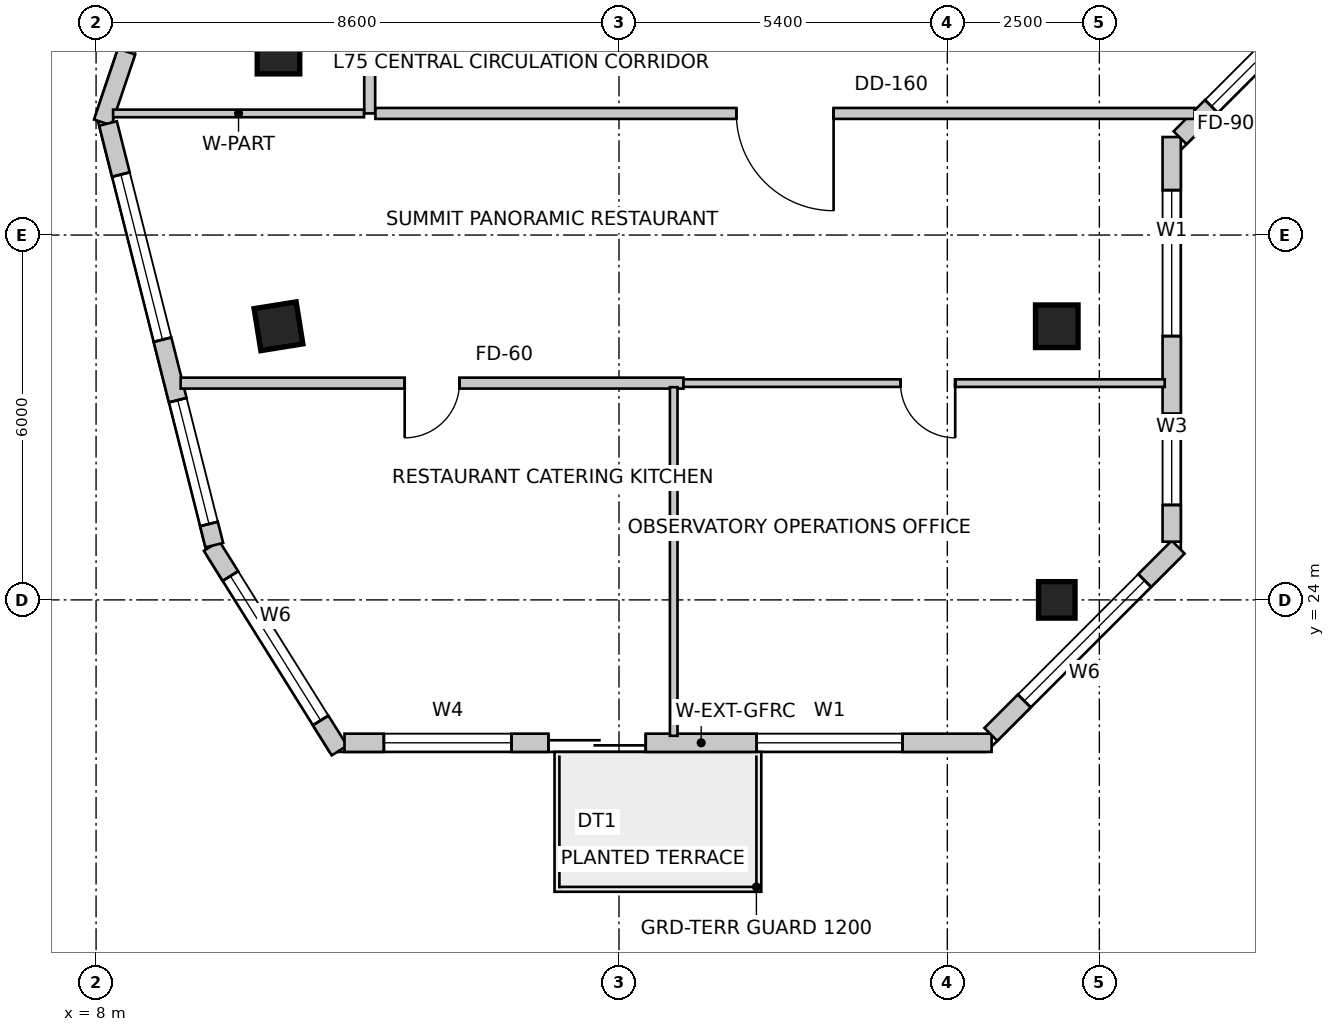
"""IFC4 building model, lengths in metres.
Left out: names, types, materials, properties, quantities, classifications, styles, units other than length and angle.
Written with IfcOpenShell. Run it as: python <this file> out.ifc"""

import sys

from ifc_helpers import new_model, si_unit, direction, frame, frame_2d, origin, origin_2d, place, context, subcontext, project, spatial, rectangle, extrude, source, transform, mapped, element, fill, save


model = new_model("IFC4")
c1 = context("Model", 3, precision=1e-05, world=origin(), true_north=direction((0.0, 1.0)))
c2 = subcontext(c1, "Body", "Model", "MODEL_VIEW")
j1 = project(units=[si_unit("LENGTHUNIT", "METRE"), si_unit("PLANEANGLEUNIT", "RADIAN")], contexts=[c1])
p1 = place(None, origin())
s1 = spatial("IfcSite", under=j1, at=p1, CompositionType="ELEMENT")
p2 = place(p1, origin())
s2 = spatial("IfcBuilding", under=s1, at=p2, CompositionType="ELEMENT")
p3 = place(p2, frame((0.0, 0.0, 292.5)))
s3 = spatial("IfcBuildingStorey", under=s2, at=p3, CompositionType="ELEMENT", Elevation=292.5)
m1 = source(origin(), c2, "Body", "SweptSolid", [
    extrude(rectangle(XDim=0.7, YDim=0.7, at=origin_2d()), origin(), (0.0, 0.0, 1.0), 4.0),
])
for number, where, z_axis, x_axis in (
    (1, (11.0, 33.0, 0.0), (0.0, 0.0, 1.0), (1.0, 0.0, 0.0)),
    (2, (11.0, 28.5, 0.0), (0.0, 0.0, 1.0), (0.158, -0.987, 0.0)),
    (3, (23.8, 28.5, 0.0), (0.0, 0.0, 1.0), (1.0, 0.0, 0.0)),
):
    element("IfcColumn", number, at=place(p3, frame(where, z_axis=z_axis, x_axis=x_axis)), inside=s3, PredefinedType="COLUMN", context=c2, shape_type="MappedRepresentation", body=[
        mapped(m1, transform((0.0, 0.0, 0.0), scale=1.0)),
    ])
m2 = source(origin(), c2, "Body", "SweptSolid", [
    extrude(rectangle(XDim=0.6, YDim=0.6, at=origin_2d()), origin(), (0.0, 0.0, 1.0), 4.0),
])
p4 = place(p3, frame((23.8, 24.0, 0.0), z_axis=(0.0, 0.0, 1.0), x_axis=(1.0, 0.0, 0.0)))
e4 = element("IfcColumn", 4, at=p4, inside=s3, PredefinedType="COLUMN", context=c2, shape_type="MappedRepresentation", body=[
    mapped(m2, transform((0.0, 0.0, 0.0), scale=1.0)),
])
p5 = place(p3, frame((9.9, 24.887, 0.0), z_axis=(0.0, 0.0, 1.0), x_axis=(0.530004471907, -0.84799484654, 0.0)))
e5 = element("IfcWall", 5, at=p5, inside=s3, PredefinedType="SOLIDWALL", context=c2, shape_type="SweptSolid", body=[
    extrude(rectangle(XDim=3.967, YDim=0.3, at=frame_2d((1.983, 0.0))), origin(), (0.0, 0.0, 1.0), 3.75),
])
m3 = source(origin(), c2, "Body", "SweptSolid", [
    extrude(rectangle(XDim=2.8, YDim=2.4, at=frame_2d((1.4, 1.2))), frame((0.0, 0.16, 0.0), z_axis=(0.0, -1.0, 0.0), x_axis=(1.0, 0.0, 0.0)), (0.0, 0.0, 1.0), 0.32),
])
p6 = place(p5, frame((0.583, 0.0, 0.85)))
e6 = element("IfcOpeningElement", 6, at=p6, cuts=e5, PredefinedType="OPENING", context=c2, shape_type="MappedRepresentation", body=[
    mapped(m3, transform((0.0, 0.0, 0.0), scale=1.0)),
])
p7 = place(p3, frame((12.086, 21.65, 0.0), z_axis=(0.0, 0.0, 1.0), x_axis=(1.0, 0.0, 0.0)))
e7 = element("IfcWall", 7, at=p7, inside=s3, PredefinedType="SOLIDWALL", context=c2, shape_type="SweptSolid", body=[
    extrude(rectangle(XDim=10.642, YDim=0.3, at=frame_2d((5.321, 0.0))), origin(), (0.0, 0.0, 1.0), 3.75),
])
m4 = source(origin(), c2, "Body", "SweptSolid", [
    extrude(rectangle(XDim=1.6, YDim=2.15, at=frame_2d((0.8, 1.075))), frame((0.0, 0.16, 0.0), z_axis=(0.0, -1.0, 0.0), x_axis=(1.0, 0.0, 0.0)), (0.0, 0.0, 1.0), 0.32),
])
p8 = place(p7, frame((3.354, 0.0, 0.0)))
e8 = element("IfcOpeningElement", 8, at=p8, cuts=e7, PredefinedType="OPENING", context=c2, shape_type="MappedRepresentation", body=[
    mapped(m4, transform((0.0, 0.0, 0.0), scale=1.0)),
])
m5 = source(origin(), c2, "Body", "SweptSolid", [
    extrude(rectangle(XDim=2.1, YDim=2.0, at=frame_2d((1.05, 1.0))), frame((0.0, 0.16, 0.0), z_axis=(0.0, -1.0, 0.0), x_axis=(1.0, 0.0, 0.0)), (0.0, 0.0, 1.0), 0.32),
])
p9 = place(p7, frame((0.647, 0.0, 0.85)))
e9 = element("IfcOpeningElement", 9, at=p9, cuts=e7, PredefinedType="OPENING", context=c2, shape_type="MappedRepresentation", body=[
    mapped(m5, transform((0.0, 0.0, 0.0), scale=1.0)),
])
m6 = source(origin(), c2, "Body", "SweptSolid", [
    extrude(rectangle(XDim=2.4, YDim=2.2, at=frame_2d((1.2, 1.1))), frame((0.0, 0.16, 0.0), z_axis=(0.0, -1.0, 0.0), x_axis=(1.0, 0.0, 0.0)), (0.0, 0.0, 1.0), 0.32),
])
p10 = place(p7, frame((6.778, 0.0, 0.85)))
e10 = element("IfcOpeningElement", 10, at=p10, cuts=e7, PredefinedType="OPENING", context=c2, shape_type="MappedRepresentation", body=[
    mapped(m6, transform((0.0, 0.0, 0.0), scale=1.0)),
])
p11 = place(p3, frame((22.716, 21.788, 0.0), z_axis=(0.0, 0.0, 1.0), x_axis=(0.707134803727, 0.707078757535, 0.0)))
e11 = element("IfcWall", 11, at=p11, inside=s3, PredefinedType="SOLIDWALL", context=c2, shape_type="SweptSolid", body=[
    extrude(rectangle(XDim=4.356, YDim=0.3, at=frame_2d((2.178, 0.0))), origin(), (0.0, 0.0, 1.0), 3.75),
])
p12 = place(p11, frame((0.778, 0.0, 0.85)))
e12 = element("IfcOpeningElement", 12, at=p12, cuts=e11, PredefinedType="OPENING", context=c2, shape_type="MappedRepresentation", body=[
    mapped(m3, transform((0.0, 0.0, 0.0), scale=1.0)),
])
p13 = place(p3, frame((25.69, 24.957, 0.0), z_axis=(0.0, 0.0, 1.0), x_axis=(0.0, 1.0, 0.0)))
e13 = element("IfcWall", 13, at=p13, inside=s3, PredefinedType="SOLIDWALL", context=c2, shape_type="SweptSolid", body=[
    extrude(rectangle(XDim=6.655, YDim=0.3, at=frame_2d((3.327, 0.0))), origin(), (0.0, 0.0, 1.0), 3.75),
])
m7 = source(origin(), c2, "Body", "SweptSolid", [
    extrude(rectangle(XDim=1.5, YDim=1.8, at=frame_2d((0.75, 0.9))), frame((0.0, 0.16, 0.0), z_axis=(0.0, -1.0, 0.0), x_axis=(1.0, 0.0, 0.0)), (0.0, 0.0, 1.0), 0.32),
])
p14 = place(p13, frame((0.604, 0.0, 0.85)))
e14 = element("IfcOpeningElement", 14, at=p14, cuts=e13, PredefinedType="OPENING", context=c2, shape_type="MappedRepresentation", body=[
    mapped(m7, transform((0.0, 0.0, 0.0), scale=1.0)),
])
p15 = place(p13, frame((3.381, 0.0, 0.85)))
e15 = element("IfcOpeningElement", 15, at=p15, cuts=e13, PredefinedType="OPENING", context=c2, shape_type="MappedRepresentation", body=[
    mapped(m6, transform((0.0, 0.0, 0.0), scale=1.0)),
])
p16 = place(p3, frame((25.828, 31.6, 0.0), z_axis=(0.0, 0.0, 1.0), x_axis=(0.707106781187, 0.707106781187, 0.0)))
e16 = element("IfcWall", 16, at=p16, inside=s3, PredefinedType="SOLIDWALL", context=c2, shape_type="SweptSolid", body=[
    extrude(rectangle(XDim=2.907, YDim=0.3, at=frame_2d((1.454, 0.0))), origin(), (0.0, 0.0, 1.0), 3.75),
])
m8 = source(origin(), c2, "Body", "SweptSolid", [
    extrude(rectangle(XDim=1.8, YDim=2.1, at=frame_2d((0.9, 1.05))), frame((0.0, 0.16, 0.0), z_axis=(0.0, -1.0, 0.0), x_axis=(1.0, 0.0, 0.0)), (0.0, 0.0, 1.0), 0.32),
])
p17 = place(p16, frame((0.729, 0.0, 0.85)))
e17 = element("IfcOpeningElement", 17, at=p17, cuts=e16, PredefinedType="OPENING", context=c2, shape_type="MappedRepresentation", body=[
    mapped(m8, transform((0.0, 0.0, 0.0), scale=1.0)),
])
p18 = place(p3, frame((8.502, 33.017, 0.0), z_axis=(0.0, 0.0, 1.0), x_axis=(-0.319798692732, -0.947485512357, 0.0)))
e18 = element("IfcWall", 18, at=p18, inside=s3, PredefinedType="SOLIDWALL", context=c2, shape_type="SweptSolid", body=[
    extrude(rectangle(XDim=1.23, YDim=0.3, at=frame_2d((0.615, 0.0))), origin(), (0.0, 0.0, 1.0), 3.75),
])
p19 = place(p3, frame((8.196, 31.835, 0.0), z_axis=(0.0, 0.0, 1.0), x_axis=(0.244430846523, -0.969666726906, 0.0)))
e19 = element("IfcWall", 19, at=p19, inside=s3, PredefinedType="SOLIDWALL", context=c2, shape_type="SweptSolid", body=[
    extrude(rectangle(XDim=7.152, YDim=0.3, at=frame_2d((3.576, 0.0))), origin(), (0.0, 0.0, 1.0), 3.75),
])
p20 = place(p19, frame((0.866, 0.0, 0.85)))
e20 = element("IfcOpeningElement", 20, at=p20, cuts=e19, PredefinedType="OPENING", context=c2, shape_type="MappedRepresentation", body=[
    mapped(m3, transform((0.0, 0.0, 0.0), scale=1.0)),
])
p21 = place(p19, frame((4.692, 0.0, 0.85)))
e21 = element("IfcOpeningElement", 21, at=p21, cuts=e19, PredefinedType="OPENING", context=c2, shape_type="MappedRepresentation", body=[
    mapped(m5, transform((0.0, 0.0, 0.0), scale=1.0)),
])
p22 = place(p3, frame((12.5, 32.0, 0.0), z_axis=(0.0, 0.0, 1.0), x_axis=(0.0, 1.0, 0.0)))
e22 = element("IfcWall", 22, at=p22, inside=s3, PredefinedType="PARTITIONING", context=c2, shape_type="SweptSolid", body=[
    extrude(rectangle(XDim=1.556, YDim=0.18, at=frame_2d((0.778, 0.0))), origin(), (0.0, 0.0, 1.0), 3.335),
])
p23 = place(p3, frame((26.065, 32.0, 0.0), z_axis=(0.0, 0.0, 1.0), x_axis=(-1.0, 0.0, 0.0)))
e23 = element("IfcWall", 23, at=p23, inside=s3, PredefinedType="PARTITIONING", context=c2, shape_type="SweptSolid", body=[
    extrude(rectangle(XDim=13.471, YDim=0.18, at=frame_2d((6.736, 0.0))), origin(), (0.0, 0.0, 1.0), 3.335),
])
m9 = source(origin(), c2, "Body", "SweptSolid", [
    extrude(rectangle(XDim=1.6, YDim=2.15, at=frame_2d((0.8, 1.075))), frame((0.0, 0.1, 0.0), z_axis=(0.0, -1.0, 0.0), x_axis=(1.0, 0.0, 0.0)), (0.0, 0.0, 1.0), 0.2),
])
p24 = place(p23, frame((5.936, 0.0, 0.0)))
e24 = element("IfcOpeningElement", 24, at=p24, cuts=e23, PredefinedType="OPENING", context=c2, shape_type="MappedRepresentation", body=[
    mapped(m9, transform((0.0, 0.0, 0.0), scale=1.0)),
])
p25 = place(p3, frame((12.406, 32.0, 0.0), z_axis=(0.0, 0.0, 1.0), x_axis=(-1.0, 0.0, 0.0)))
e25 = element("IfcWall", 25, at=p25, inside=s3, PredefinedType="PARTITIONING", context=c2, shape_type="SweptSolid", body=[
    extrude(rectangle(XDim=4.126, YDim=0.125, at=frame_2d((2.063, 0.0))), origin(), (0.0, 0.0, 1.0), 3.042),
])
p26 = place(p3, frame((17.66, 27.565, 0.0), z_axis=(0.0, 0.0, 1.0), x_axis=(-1.0, 0.0, 0.0)))
e26 = element("IfcWall", 26, at=p26, inside=s3, PredefinedType="PARTITIONING", context=c2, shape_type="SweptSolid", body=[
    extrude(rectangle(XDim=8.269, YDim=0.18, at=frame_2d((4.134, 0.0))), origin(), (0.0, 0.0, 1.0), 3.335),
])
m10 = source(origin(), c2, "Body", "SweptSolid", [
    extrude(rectangle(XDim=0.9, YDim=2.15, at=frame_2d((0.45, 1.075))), frame((0.0, 0.1, 0.0), z_axis=(0.0, -1.0, 0.0), x_axis=(1.0, 0.0, 0.0)), (0.0, 0.0, 1.0), 0.2),
])
p27 = place(p26, frame((3.684, 0.0, 0.0)))
e27 = element("IfcOpeningElement", 27, at=p27, cuts=e26, PredefinedType="OPENING", context=c2, shape_type="MappedRepresentation", body=[
    mapped(m10, transform((0.0, 0.0, 0.0), scale=1.0)),
])
p28 = place(p3, frame((25.575, 27.565, 0.0), z_axis=(0.0, 0.0, 1.0), x_axis=(-1.0, 0.0, 0.0)))
e28 = element("IfcWall", 28, at=p28, inside=s3, PredefinedType="PARTITIONING", context=c2, shape_type="SweptSolid", body=[
    extrude(rectangle(XDim=7.913, YDim=0.125, at=frame_2d((3.957, 0.0))), origin(), (0.0, 0.0, 1.0), 3.042),
])
m11 = source(origin(), c2, "Body", "SweptSolid", [
    extrude(rectangle(XDim=0.9, YDim=2.15, at=frame_2d((0.45, 1.075))), frame((0.0, 0.073, 0.0), z_axis=(0.0, -1.0, 0.0), x_axis=(1.0, 0.0, 0.0)), (0.0, 0.0, 1.0), 0.145),
])
p29 = place(p28, frame((3.446, 0.0, 0.0)))
e29 = element("IfcOpeningElement", 29, at=p29, cuts=e28, PredefinedType="OPENING", context=c2, shape_type="MappedRepresentation", body=[
    mapped(m11, transform((0.0, 0.0, 0.0), scale=1.0)),
])
p30 = place(p3, frame((17.5, 27.499, 0.0), z_axis=(0.0, 0.0, 1.0), x_axis=(0.0, -1.0, 0.0)))
e30 = element("IfcWall", 30, at=p30, inside=s3, PredefinedType="PARTITIONING", context=c2, shape_type="SweptSolid", body=[
    extrude(rectangle(XDim=5.734, YDim=0.125, at=frame_2d((2.867, 0.0))), origin(), (0.0, 0.0, 1.0), 3.335),
])
m12 = source(origin(), c2, "Body", "SweptSolid", [
    extrude(rectangle(XDim=2.8, YDim=2.4, at=frame_2d((1.4, 1.2))), frame((0.0, -0.015, 0.0), z_axis=(0.0, -1.0, 0.0), x_axis=(1.0, 0.0, 0.0)), (0.0, 0.0, 1.0), 0.06),
])
p31 = place(p6, origin())
e31 = element("IfcWindow", 31, at=p31, inside=s3, PartitioningType="SINGLE_PANEL", PredefinedType="WINDOW", context=c2, shape_type="MappedRepresentation", body=[
    mapped(m12, transform((0.0, 0.0, 0.0), scale=1.0)),
])
fill(e6, e31)
m13 = source(origin(), c2, "Body", "SweptSolid", [
    extrude(rectangle(XDim=1.6, YDim=2.15, at=frame_2d((0.8, 1.075))), frame((0.0, 0.025, 0.0), z_axis=(0.0, -1.0, 0.0), x_axis=(1.0, 0.0, 0.0)), (0.0, 0.0, 1.0), 0.05),
])
p32 = place(p8, origin())
e32 = element("IfcDoor", 32, at=p32, inside=s3, OperationType="DOUBLE_DOOR_SLIDING", PredefinedType="DOOR", context=c2, shape_type="MappedRepresentation", body=[
    mapped(m13, transform((0.0, 0.0, 0.0), scale=1.0)),
])
fill(e8, e32)
m14 = source(origin(), c2, "Body", "SweptSolid", [
    extrude(rectangle(XDim=2.1, YDim=2.0, at=frame_2d((1.05, 1.0))), frame((0.0, -0.015, 0.0), z_axis=(0.0, -1.0, 0.0), x_axis=(1.0, 0.0, 0.0)), (0.0, 0.0, 1.0), 0.06),
])
p33 = place(p9, origin())
e33 = element("IfcWindow", 33, at=p33, inside=s3, PartitioningType="SINGLE_PANEL", PredefinedType="WINDOW", context=c2, shape_type="MappedRepresentation", body=[
    mapped(m14, transform((0.0, 0.0, 0.0), scale=1.0)),
])
fill(e9, e33)
m15 = source(origin(), c2, "Body", "SweptSolid", [
    extrude(rectangle(XDim=2.4, YDim=2.2, at=frame_2d((1.2, 1.1))), frame((0.0, -0.015, 0.0), z_axis=(0.0, -1.0, 0.0), x_axis=(1.0, 0.0, 0.0)), (0.0, 0.0, 1.0), 0.06),
])
p34 = place(p10, origin())
e34 = element("IfcWindow", 34, at=p34, inside=s3, PartitioningType="SINGLE_PANEL", PredefinedType="WINDOW", context=c2, shape_type="MappedRepresentation", body=[
    mapped(m15, transform((0.0, 0.0, 0.0), scale=1.0)),
])
fill(e10, e34)
p35 = place(p12, origin())
e35 = element("IfcWindow", 35, at=p35, inside=s3, PartitioningType="SINGLE_PANEL", PredefinedType="WINDOW", context=c2, shape_type="MappedRepresentation", body=[
    mapped(m12, transform((0.0, 0.0, 0.0), scale=1.0)),
])
fill(e12, e35)
m16 = source(origin(), c2, "Body", "SweptSolid", [
    extrude(rectangle(XDim=1.5, YDim=1.8, at=frame_2d((0.75, 0.9))), frame((0.0, -0.015, 0.0), z_axis=(0.0, -1.0, 0.0), x_axis=(1.0, 0.0, 0.0)), (0.0, 0.0, 1.0), 0.06),
])
p36 = place(p14, origin())
e36 = element("IfcWindow", 36, at=p36, inside=s3, PartitioningType="SINGLE_PANEL", PredefinedType="WINDOW", context=c2, shape_type="MappedRepresentation", body=[
    mapped(m16, transform((0.0, 0.0, 0.0), scale=1.0)),
])
fill(e14, e36)
p37 = place(p15, origin())
e37 = element("IfcWindow", 37, at=p37, inside=s3, PartitioningType="SINGLE_PANEL", PredefinedType="WINDOW", context=c2, shape_type="MappedRepresentation", body=[
    mapped(m15, transform((0.0, 0.0, 0.0), scale=1.0)),
])
fill(e15, e37)
m17 = source(origin(), c2, "Body", "SweptSolid", [
    extrude(rectangle(XDim=1.8, YDim=2.1, at=frame_2d((0.9, 1.05))), frame((0.0, -0.015, 0.0), z_axis=(0.0, -1.0, 0.0), x_axis=(1.0, 0.0, 0.0)), (0.0, 0.0, 1.0), 0.06),
])
p38 = place(p17, origin())
e38 = element("IfcWindow", 38, at=p38, inside=s3, PartitioningType="SINGLE_PANEL", PredefinedType="WINDOW", context=c2, shape_type="MappedRepresentation", body=[
    mapped(m17, transform((0.0, 0.0, 0.0), scale=1.0)),
])
fill(e17, e38)
p39 = place(p20, origin())
e39 = element("IfcWindow", 39, at=p39, inside=s3, PartitioningType="SINGLE_PANEL", PredefinedType="WINDOW", context=c2, shape_type="MappedRepresentation", body=[
    mapped(m12, transform((0.0, 0.0, 0.0), scale=1.0)),
])
fill(e20, e39)
p40 = place(p21, origin())
e40 = element("IfcWindow", 40, at=p40, inside=s3, PartitioningType="SINGLE_PANEL", PredefinedType="WINDOW", context=c2, shape_type="MappedRepresentation", body=[
    mapped(m14, transform((0.0, 0.0, 0.0), scale=1.0)),
])
fill(e21, e40)
m18 = source(origin(), c2, "Body", "SweptSolid", [
    extrude(rectangle(XDim=1.6, YDim=2.15, at=frame_2d((0.8, 1.075))), frame((0.0, 0.025, 0.0), z_axis=(0.0, -1.0, 0.0), x_axis=(1.0, 0.0, 0.0)), (0.0, 0.0, 1.0), 0.05),
])
p41 = place(p24, origin())
e41 = element("IfcDoor", 41, at=p41, inside=s3, OperationType="SINGLE_SWING_LEFT", PredefinedType="DOOR", context=c2, shape_type="MappedRepresentation", body=[
    mapped(m18, transform((0.0, 0.0, 0.0), scale=1.0)),
])
fill(e24, e41)
m19 = source(origin(), c2, "Body", "SweptSolid", [
    extrude(rectangle(XDim=0.9, YDim=2.15, at=frame_2d((0.45, 1.075))), frame((0.0, 0.025, 0.0), z_axis=(0.0, -1.0, 0.0), x_axis=(1.0, 0.0, 0.0)), (0.0, 0.0, 1.0), 0.05),
])
p42 = place(p27, origin())
e42 = element("IfcDoor", 42, at=p42, inside=s3, OperationType="SINGLE_SWING_RIGHT", PredefinedType="DOOR", context=c2, shape_type="MappedRepresentation", body=[
    mapped(m19, transform((0.0, 0.0, 0.0), scale=1.0)),
])
fill(e27, e42)
m20 = source(origin(), c2, "Body", "SweptSolid", [
    extrude(rectangle(XDim=0.9, YDim=2.15, at=frame_2d((0.45, 1.075))), frame((0.0, 0.025, 0.0), z_axis=(0.0, -1.0, 0.0), x_axis=(1.0, 0.0, 0.0)), (0.0, 0.0, 1.0), 0.05),
])
p43 = place(p29, origin())
e43 = element("IfcDoor", 43, at=p43, inside=s3, OperationType="SINGLE_SWING_LEFT", PredefinedType="DOOR", context=c2, shape_type="MappedRepresentation", body=[
    mapped(m20, transform((0.0, 0.0, 0.0), scale=1.0)),
])
fill(e29, e43)
save(model, sys.argv[1])
